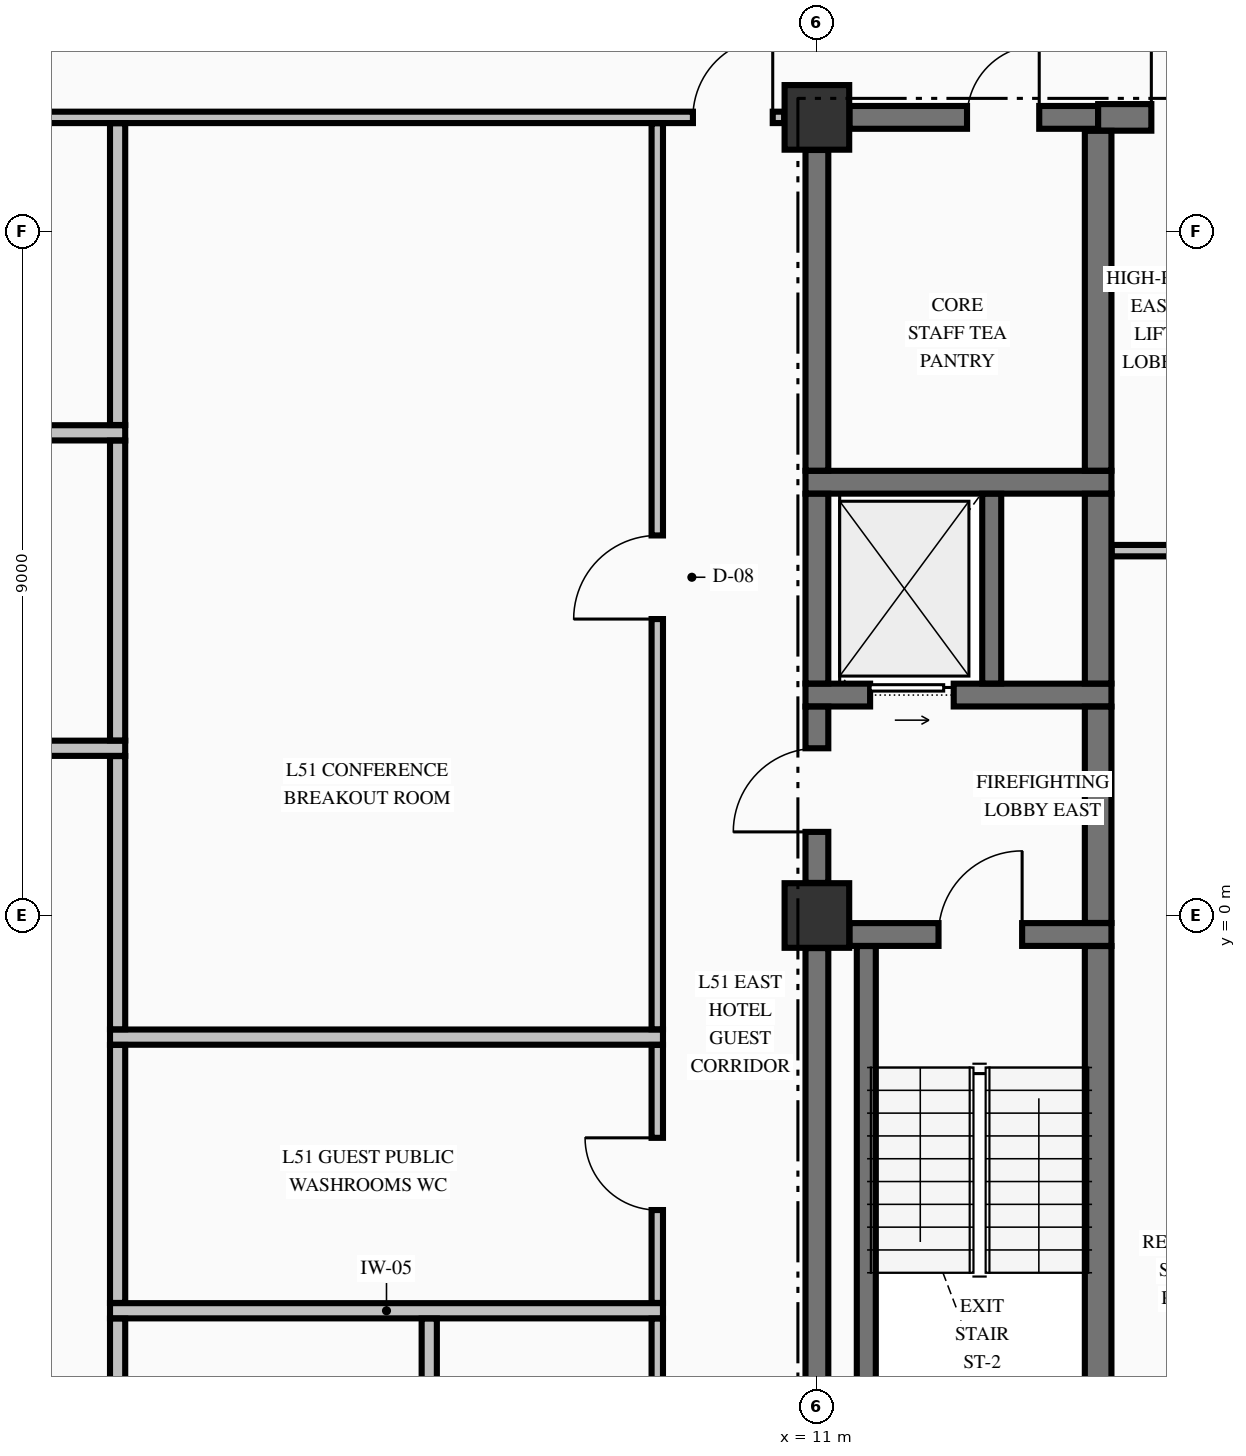
"""IFC4 building model, lengths in metres.
Left out: names, types, materials, properties, quantities, classifications, styles, units other than length and angle.
Written with IfcOpenShell. Run it as: python <this file> out.ifc"""

import sys

from ifc_helpers import new_model, si_unit, direction, frame, frame_2d, origin, origin_2d, place, context, subcontext, project, spatial, rectangle, extrude, element, fill, save


model = new_model("IFC4")
c1 = context("Model", 3, precision=1e-05, world=origin(), true_north=direction((0.0, 1.0)))
c2 = subcontext(c1, "Body", "Model", "MODEL_VIEW")
j1 = project(units=[si_unit("LENGTHUNIT", "METRE"), si_unit("PLANEANGLEUNIT", "RADIAN")], contexts=[c1])
p1 = place(None, origin())
s1 = spatial("IfcSite", under=j1, at=p1, CompositionType="ELEMENT")
p2 = place(p1, origin())
s2 = spatial("IfcBuilding", under=s1, at=p2, CompositionType="ELEMENT")
p3 = place(p2, frame((0.0, 0.0, 198.26)))
s3 = spatial("IfcBuildingStorey", under=s2, at=p3, CompositionType="ELEMENT", Elevation=198.26)
for number, where, z_axis, x_axis in (
    (1, (11.0, 0.0, -0.25), (0.0, 0.0, 1.0), (1.0, 0.0, 0.0)),
    (2, (11.0, 10.5, -0.25), (0.0, 0.0, 1.0), (1.0, 0.0, 0.0)),
):
    element("IfcColumn", number, at=place(p3, frame(where, z_axis=z_axis, x_axis=x_axis)), inside=s3, PredefinedType="COLUMN", context=c2, shape_type="SweptSolid", body=[
        extrude(rectangle(XDim=0.85, YDim=0.85, at=origin_2d()), origin(), (0.0, 0.0, 1.0), 3.4),
    ])
p4 = place(p3, frame((11.429, -0.25, 0.0), z_axis=(0.0, 0.0, 1.0), x_axis=(1.0, 0.0, 0.0)))
e3 = element("IfcWall", 3, at=p4, inside=s3, PredefinedType="SHEAR", context=c2, shape_type="SweptSolid", body=[
    extrude(rectangle(XDim=3.446, YDim=0.3, at=frame_2d((1.723, 0.0))), origin(), (0.0, 0.0, 1.0), 3.15),
])
p5 = place(p4, frame((1.171, 0.0, 0.0)))
e4 = element("IfcOpeningElement", 4, at=p5, cuts=e3, PredefinedType="OPENING", context=c2, shape_type="SweptSolid", body=[
    extrude(rectangle(XDim=1.1, YDim=2.15, at=frame_2d((0.55, 1.075))), frame((0.0, 0.16, 0.0), z_axis=(0.0, -1.0, 0.0), x_axis=(1.0, 0.0, 0.0)), (0.0, 0.0, 1.0), 0.32),
])
p6 = place(p3, frame((10.85, 2.9, 0.0), z_axis=(0.0, 0.0, 1.0), x_axis=(1.0, 0.0, 0.0)))
e5 = element("IfcWall", 5, at=p6, inside=s3, PredefinedType="SHEAR", context=c2, shape_type="SweptSolid", body=[
    extrude(rectangle(XDim=4.025, YDim=0.3, at=frame_2d((2.012, 0.0))), origin(), (0.0, 0.0, 1.0), 3.15),
])
p7 = place(p6, frame((0.85, 0.0, 0.0)))
e6 = element("IfcOpeningElement", 6, at=p7, cuts=e5, PredefinedType="OPENING", context=c2, shape_type="SweptSolid", body=[
    extrude(rectangle(XDim=1.1, YDim=2.2, at=frame_2d((0.55, 1.1))), frame((0.0, 0.16, 0.0), z_axis=(0.0, -1.0, 0.0), x_axis=(1.0, 0.0, 0.0)), (0.0, 0.0, 1.0), 0.32),
])
p8 = place(p3, frame((10.85, 5.7, 0.0), z_axis=(0.0, 0.0, 1.0), x_axis=(1.0, 0.0, 0.0)))
e7 = element("IfcWall", 7, at=p8, inside=s3, PredefinedType="SHEAR", context=c2, shape_type="SweptSolid", body=[
    extrude(rectangle(XDim=4.025, YDim=0.3, at=frame_2d((2.012, 0.0))), origin(), (0.0, 0.0, 1.0), 3.15),
])
p9 = place(p3, frame((11.429, 10.5, 0.0), z_axis=(0.0, 0.0, 1.0), x_axis=(1.0, 0.0, 0.0)))
e8 = element("IfcWall", 8, at=p9, inside=s3, PredefinedType="SHEAR", context=c2, shape_type="SweptSolid", body=[
    extrude(rectangle(XDim=3.271, YDim=0.3, at=frame_2d((1.635, 0.0))), origin(), (0.0, 0.0, 1.0), 3.15),
])
p10 = place(p9, frame((1.546, 0.0, 0.0)))
e9 = element("IfcOpeningElement", 9, at=p10, cuts=e8, PredefinedType="OPENING", context=c2, shape_type="SweptSolid", body=[
    extrude(rectangle(XDim=0.95, YDim=2.15, at=frame_2d((0.475, 1.075))), frame((0.0, 0.16, 0.0), z_axis=(0.0, -1.0, 0.0), x_axis=(1.0, 0.0, 0.0)), (0.0, 0.0, 1.0), 0.32),
])
p11 = place(p3, frame((14.7, 10.5, 0.0), z_axis=(0.0, 0.0, 1.0), x_axis=(1.0, 0.0, 0.0)))
e10 = element("IfcWall", 10, at=p11, inside=s3, PredefinedType="SHEAR", context=c2, shape_type="SweptSolid", body=[
    extrude(rectangle(XDim=4.871, YDim=0.35, at=frame_2d((2.436, 0.0))), origin(), (0.0, 0.0, 1.0), 3.15),
])
p12 = place(p11, frame((0.7, 0.0, 0.0)))
e11 = element("IfcOpeningElement", 11, at=p12, cuts=e10, PredefinedType="OPENING", context=c2, shape_type="SweptSolid", body=[
    extrude(rectangle(XDim=1.1, YDim=2.15, at=frame_2d((0.55, 1.075))), frame((0.0, 0.185, 0.0), z_axis=(0.0, -1.0, 0.0), x_axis=(1.0, 0.0, 0.0)), (0.0, 0.0, 1.0), 0.37),
])
for number, where, z_axis, x_axis in (
    (12, (1.7, -5.2, 0.0), (0.0, 0.0, 1.0), (1.0, 0.0, 0.0)),
    (13, (1.7, -1.6, 0.0), (0.0, 0.0, 1.0), (1.0, 0.0, 0.0)),
):
    element("IfcWall", number, at=place(p3, frame(where, z_axis=z_axis, x_axis=x_axis)), inside=s3, PredefinedType="PARTITIONING", context=c2, shape_type="SweptSolid", body=[
        extrude(rectangle(XDim=7.275, YDim=0.2, at=frame_2d((3.638, 0.0))), origin(), (0.0, 0.0, 1.0), 3.15),
    ])
p13 = place(p3, frame((-8.975, 2.2, 0.0), z_axis=(0.0, 0.0, 1.0), x_axis=(1.0, 0.0, 0.0)))
e14 = element("IfcWall", 14, at=p13, inside=s3, PredefinedType="PARTITIONING", context=c2, shape_type="SweptSolid", body=[
    extrude(rectangle(XDim=10.875, YDim=0.2, at=frame_2d((5.438, 0.0))), origin(), (0.0, 0.0, 1.0), 3.15),
])
p14 = place(p3, frame((14.878, 4.8, 0.0), z_axis=(0.0, 0.0, 1.0), x_axis=(1.0, 0.0, 0.0)))
e15 = element("IfcWall", 15, at=p14, inside=s3, PredefinedType="PARTITIONING", context=c2, shape_type="SweptSolid", body=[
    extrude(rectangle(XDim=4.944, YDim=0.15, at=frame_2d((2.472, 0.0))), origin(), (0.0, 0.0, 1.0), 3.15),
])
p15 = place(p3, frame((-8.975, 6.35, 0.0), z_axis=(0.0, 0.0, 1.0), x_axis=(1.0, 0.0, 0.0)))
e16 = element("IfcWall", 16, at=p15, inside=s3, PredefinedType="PARTITIONING", context=c2, shape_type="SweptSolid", body=[
    extrude(rectangle(XDim=10.875, YDim=0.2, at=frame_2d((5.438, 0.0))), origin(), (0.0, 0.0, 1.0), 3.15),
])
p16 = place(p3, frame((-10.569, 10.5, 0.0), z_axis=(0.0, 0.0, 1.0), x_axis=(1.0, 0.0, 0.0)))
e17 = element("IfcWall", 17, at=p16, inside=s3, PredefinedType="PARTITIONING", context=c2, shape_type="SweptSolid", body=[
    extrude(rectangle(XDim=21.138, YDim=0.15, at=frame_2d((10.569, 0.0))), origin(), (0.0, 0.0, 1.0), 3.15),
])
p17 = place(p16, frame((0.15, 0.0, 0.0)))
e18 = element("IfcOpeningElement", 18, at=p17, cuts=e17, PredefinedType="OPENING", context=c2, shape_type="SweptSolid", body=[
    extrude(rectangle(XDim=1.05, YDim=2.15, at=frame_2d((0.525, 1.075))), frame((0.0, 0.085, 0.0), z_axis=(0.0, -1.0, 0.0), x_axis=(1.0, 0.0, 0.0)), (0.0, 0.0, 1.0), 0.17),
])
p18 = place(p16, frame((19.938, 0.0, 0.0)))
e19 = element("IfcOpeningElement", 19, at=p18, cuts=e17, PredefinedType="OPENING", context=c2, shape_type="SweptSolid", body=[
    extrude(rectangle(XDim=1.05, YDim=2.15, at=frame_2d((0.525, 1.075))), frame((0.0, 0.085, 0.0), z_axis=(0.0, -1.0, 0.0), x_axis=(1.0, 0.0, 0.0)), (0.0, 0.0, 1.0), 0.17),
])
p19 = place(p3, frame((11.0, -9.521, 0.0), z_axis=(0.0, 0.0, 1.0), x_axis=(0.0, 1.0, 0.0)))
e20 = element("IfcWall", 20, at=p19, inside=s3, PredefinedType="SHEAR", context=c2, shape_type="SweptSolid", body=[
    extrude(rectangle(XDim=9.092, YDim=0.3, at=frame_2d((4.546, 0.0))), origin(), (0.0, 0.0, 1.0), 3.15),
])
p20 = place(p3, frame((11.0, 0.429, 0.0), z_axis=(0.0, 0.0, 1.0), x_axis=(0.0, 1.0, 0.0)))
e21 = element("IfcWall", 21, at=p20, inside=s3, PredefinedType="SHEAR", context=c2, shape_type="SweptSolid", body=[
    extrude(rectangle(XDim=2.319, YDim=0.3, at=frame_2d((1.16, 0.0))), origin(), (0.0, 0.0, 1.0), 3.15),
])
p21 = place(p20, frame((0.671, 0.0, 0.0)))
e22 = element("IfcOpeningElement", 22, at=p21, cuts=e21, PredefinedType="OPENING", context=c2, shape_type="SweptSolid", body=[
    extrude(rectangle(XDim=1.1, YDim=2.15, at=frame_2d((0.55, 1.075))), frame((0.0, 0.16, 0.0), z_axis=(0.0, -1.0, 0.0), x_axis=(1.0, 0.0, 0.0)), (0.0, 0.0, 1.0), 0.32),
])
p22 = place(p3, frame((11.0, 3.052, 0.0), z_axis=(0.0, 0.0, 1.0), x_axis=(0.0, 1.0, 0.0)))
e23 = element("IfcWall", 23, at=p22, inside=s3, PredefinedType="SHEAR", context=c2, shape_type="SweptSolid", body=[
    extrude(rectangle(XDim=2.496, YDim=0.3, at=frame_2d((1.248, 0.0))), origin(), (0.0, 0.0, 1.0), 3.15),
])
p23 = place(p3, frame((11.0, 5.852, 0.0), z_axis=(0.0, 0.0, 1.0), x_axis=(0.0, 1.0, 0.0)))
e24 = element("IfcWall", 24, at=p23, inside=s3, PredefinedType="SHEAR", context=c2, shape_type="SweptSolid", body=[
    extrude(rectangle(XDim=4.219, YDim=0.3, at=frame_2d((2.109, 0.0))), origin(), (0.0, 0.0, 1.0), 3.15),
])
p24 = place(p3, frame((11.65, -9.798, 0.0), z_axis=(0.0, 0.0, 1.0), x_axis=(0.0, 1.0, 0.0)))
e25 = element("IfcWall", 25, at=p24, inside=s3, PredefinedType="SOLIDWALL", context=c2, shape_type="SweptSolid", body=[
    extrude(rectangle(XDim=9.396, YDim=0.25, at=frame_2d((4.698, 0.0))), origin(), (0.0, 0.0, 1.0), 3.15),
])
p25 = place(p3, frame((13.3, 3.052, 0.0), z_axis=(0.0, 0.0, 1.0), x_axis=(0.0, 1.0, 0.0)))
e26 = element("IfcWall", 26, at=p25, inside=s3, PredefinedType="SOLIDWALL", context=c2, shape_type="SweptSolid", body=[
    extrude(rectangle(XDim=2.496, YDim=0.25, at=frame_2d((1.248, 0.0))), origin(), (0.0, 0.0, 1.0), 3.15),
])
p26 = place(p3, frame((14.7, -9.773, 0.0), z_axis=(0.0, 0.0, 1.0), x_axis=(0.0, 1.0, 0.0)))
e27 = element("IfcWall", 27, at=p26, inside=s3, PredefinedType="SHEAR", context=c2, shape_type="SweptSolid", body=[
    extrude(rectangle(XDim=9.371, YDim=0.35, at=frame_2d((4.686, 0.0))), origin(), (0.0, 0.0, 1.0), 3.15),
])
p27 = place(p3, frame((14.7, -0.098, 0.0), z_axis=(0.0, 0.0, 1.0), x_axis=(0.0, 1.0, 0.0)))
e28 = element("IfcWall", 28, at=p27, inside=s3, PredefinedType="SHEAR", context=c2, shape_type="SweptSolid", body=[
    extrude(rectangle(XDim=2.846, YDim=0.35, at=frame_2d((1.423, 0.0))), origin(), (0.0, 0.0, 1.0), 3.15),
])
p28 = place(p3, frame((14.7, 3.052, 0.0), z_axis=(0.0, 0.0, 1.0), x_axis=(0.0, 1.0, 0.0)))
e29 = element("IfcWall", 29, at=p28, inside=s3, PredefinedType="SHEAR", context=c2, shape_type="SweptSolid", body=[
    extrude(rectangle(XDim=2.496, YDim=0.35, at=frame_2d((1.248, 0.0))), origin(), (0.0, 0.0, 1.0), 3.15),
])
p29 = place(p3, frame((14.7, 5.852, 0.0), z_axis=(0.0, 0.0, 1.0), x_axis=(0.0, 1.0, 0.0)))
e30 = element("IfcWall", 30, at=p29, inside=s3, PredefinedType="SHEAR", context=c2, shape_type="SweptSolid", body=[
    extrude(rectangle(XDim=4.471, YDim=0.35, at=frame_2d((2.235, 0.0))), origin(), (0.0, 0.0, 1.0), 3.15),
])
p30 = place(p3, frame((1.8, -9.872, 0.0), z_axis=(0.0, 0.0, 1.0), x_axis=(0.0, 1.0, 0.0)))
e31 = element("IfcWall", 31, at=p30, inside=s3, PredefinedType="PARTITIONING", context=c2, shape_type="SweptSolid", body=[
    extrude(rectangle(XDim=4.569, YDim=0.2, at=frame_2d((2.285, 0.0))), origin(), (0.0, 0.0, 1.0), 3.15),
])
p31 = place(p3, frame((1.8, -5.097, 0.0), z_axis=(0.0, 0.0, 1.0), x_axis=(0.0, 1.0, 0.0)))
e32 = element("IfcWall", 32, at=p31, inside=s3, PredefinedType="PARTITIONING", context=c2, shape_type="SweptSolid", body=[
    extrude(rectangle(XDim=3.394, YDim=0.2, at=frame_2d((1.697, 0.0))), origin(), (0.0, 0.0, 1.0), 3.15),
])
p32 = place(p3, frame((1.8, -1.497, 0.0), z_axis=(0.0, 0.0, 1.0), x_axis=(0.0, 1.0, 0.0)))
e33 = element("IfcWall", 33, at=p32, inside=s3, PredefinedType="PARTITIONING", context=c2, shape_type="SweptSolid", body=[
    extrude(rectangle(XDim=3.594, YDim=0.2, at=frame_2d((1.797, 0.0))), origin(), (0.0, 0.0, 1.0), 3.15),
])
p33 = place(p3, frame((1.8, 2.303, 0.0), z_axis=(0.0, 0.0, 1.0), x_axis=(0.0, 1.0, 0.0)))
e34 = element("IfcWall", 34, at=p33, inside=s3, PredefinedType="PARTITIONING", context=c2, shape_type="SweptSolid", body=[
    extrude(rectangle(XDim=3.944, YDim=0.2, at=frame_2d((1.972, 0.0))), origin(), (0.0, 0.0, 1.0), 3.15),
])
p34 = place(p3, frame((1.8, 6.453, 0.0), z_axis=(0.0, 0.0, 1.0), x_axis=(0.0, 1.0, 0.0)))
e35 = element("IfcWall", 35, at=p34, inside=s3, PredefinedType="PARTITIONING", context=c2, shape_type="SweptSolid", body=[
    extrude(rectangle(XDim=3.969, YDim=0.2, at=frame_2d((1.985, 0.0))), origin(), (0.0, 0.0, 1.0), 3.15),
])
p35 = place(p3, frame((5.9, -9.872, 0.0), z_axis=(0.0, 0.0, 1.0), x_axis=(0.0, 1.0, 0.0)))
e36 = element("IfcWall", 36, at=p35, inside=s3, PredefinedType="PARTITIONING", context=c2, shape_type="SweptSolid", body=[
    extrude(rectangle(XDim=4.569, YDim=0.2, at=frame_2d((2.285, 0.0))), origin(), (0.0, 0.0, 1.0), 3.15),
])
p36 = place(p3, frame((8.9, -9.872, 0.0), z_axis=(0.0, 0.0, 1.0), x_axis=(0.0, 1.0, 0.0)))
e37 = element("IfcWall", 37, at=p36, inside=s3, PredefinedType="PARTITIONING", context=c2, shape_type="SweptSolid", body=[
    extrude(rectangle(XDim=4.569, YDim=0.15, at=frame_2d((2.285, 0.0))), origin(), (0.0, 0.0, 1.0), 3.15),
])
p37 = place(p36, frame((1.847, 0.0, 0.0)))
e38 = element("IfcOpeningElement", 38, at=p37, cuts=e37, PredefinedType="OPENING", context=c2, shape_type="SweptSolid", body=[
    extrude(rectangle(XDim=0.95, YDim=2.15, at=frame_2d((0.475, 1.075))), frame((0.0, 0.085, 0.0), z_axis=(0.0, -1.0, 0.0), x_axis=(1.0, 0.0, 0.0)), (0.0, 0.0, 1.0), 0.17),
])
p38 = place(p3, frame((8.9, -5.097, 0.0), z_axis=(0.0, 0.0, 1.0), x_axis=(0.0, 1.0, 0.0)))
e39 = element("IfcWall", 39, at=p38, inside=s3, PredefinedType="PARTITIONING", context=c2, shape_type="SweptSolid", body=[
    extrude(rectangle(XDim=3.394, YDim=0.15, at=frame_2d((1.697, 0.0))), origin(), (0.0, 0.0, 1.0), 3.15),
])
p39 = place(p38, frame((1.222, 0.0, 0.0)))
e40 = element("IfcOpeningElement", 40, at=p39, cuts=e39, PredefinedType="OPENING", context=c2, shape_type="SweptSolid", body=[
    extrude(rectangle(XDim=0.95, YDim=2.15, at=frame_2d((0.475, 1.075))), frame((0.0, 0.085, 0.0), z_axis=(0.0, -1.0, 0.0), x_axis=(1.0, 0.0, 0.0)), (0.0, 0.0, 1.0), 0.17),
])
p40 = place(p3, frame((8.9, -1.497, 0.0), z_axis=(0.0, 0.0, 1.0), x_axis=(0.0, 1.0, 0.0)))
e41 = element("IfcWall", 41, at=p40, inside=s3, PredefinedType="PARTITIONING", context=c2, shape_type="SweptSolid", body=[
    extrude(rectangle(XDim=11.919, YDim=0.15, at=frame_2d((5.959, 0.0))), origin(), (0.0, 0.0, 1.0), 3.15),
])
p41 = place(p40, frame((5.397, 0.0, 0.0)))
e42 = element("IfcOpeningElement", 42, at=p41, cuts=e41, PredefinedType="OPENING", context=c2, shape_type="SweptSolid", body=[
    extrude(rectangle(XDim=1.1, YDim=2.15, at=frame_2d((0.55, 1.075))), frame((0.0, 0.085, 0.0), z_axis=(0.0, -1.0, 0.0), x_axis=(1.0, 0.0, 0.0)), (0.0, 0.0, 1.0), 0.17),
])
p42 = place(p5, origin())
e43 = element("IfcDoor", 43, at=p42, inside=s3, OperationType="SINGLE_SWING_RIGHT", PredefinedType="DOOR", context=c2, shape_type="SweptSolid", body=[
    extrude(rectangle(XDim=1.1, YDim=2.15, at=frame_2d((0.55, 1.075))), frame((0.0, 0.025, 0.0), z_axis=(0.0, -1.0, 0.0), x_axis=(1.0, 0.0, 0.0)), (0.0, 0.0, 1.0), 0.05),
])
fill(e4, e43)
p43 = place(p21, origin())
e44 = element("IfcDoor", 44, at=p43, inside=s3, OperationType="SINGLE_SWING_LEFT", PredefinedType="DOOR", context=c2, shape_type="SweptSolid", body=[
    extrude(rectangle(XDim=1.1, YDim=2.15, at=frame_2d((0.55, 1.075))), frame((0.0, 0.025, 0.0), z_axis=(0.0, -1.0, 0.0), x_axis=(1.0, 0.0, 0.0)), (0.0, 0.0, 1.0), 0.05),
])
fill(e22, e44)
p44 = place(p7, origin())
e45 = element("IfcDoor", 45, at=p44, inside=s3, OperationType="SLIDING_TO_RIGHT", PredefinedType="DOOR", context=c2, shape_type="SweptSolid", body=[
    extrude(rectangle(XDim=1.1, YDim=2.2, at=frame_2d((0.55, 1.1))), frame((0.0, 0.025, 0.0), z_axis=(0.0, -1.0, 0.0), x_axis=(1.0, 0.0, 0.0)), (0.0, 0.0, 1.0), 0.05),
])
fill(e6, e45)
p45 = place(p10, origin())
e46 = element("IfcDoor", 46, at=p45, inside=s3, OperationType="SINGLE_SWING_RIGHT", PredefinedType="DOOR", context=c2, shape_type="SweptSolid", body=[
    extrude(rectangle(XDim=0.95, YDim=2.15, at=frame_2d((0.475, 1.075))), frame((0.0, 0.025, 0.0), z_axis=(0.0, -1.0, 0.0), x_axis=(1.0, 0.0, 0.0)), (0.0, 0.0, 1.0), 0.05),
])
fill(e9, e46)
p46 = place(p12, origin())
e47 = element("IfcDoor", 47, at=p46, inside=s3, OperationType="SINGLE_SWING_LEFT", PredefinedType="DOOR", context=c2, shape_type="SweptSolid", body=[
    extrude(rectangle(XDim=1.1, YDim=2.15, at=frame_2d((0.55, 1.075))), frame((0.0, 0.025, 0.0), z_axis=(0.0, -1.0, 0.0), x_axis=(1.0, 0.0, 0.0)), (0.0, 0.0, 1.0), 0.05),
])
fill(e11, e47)
p47 = place(p18, origin())
e48 = element("IfcDoor", 48, at=p47, inside=s3, OperationType="SINGLE_SWING_RIGHT", PredefinedType="DOOR", context=c2, shape_type="SweptSolid", body=[
    extrude(rectangle(XDim=1.05, YDim=2.15, at=frame_2d((0.525, 1.075))), frame((0.0, 0.025, 0.0), z_axis=(0.0, -1.0, 0.0), x_axis=(1.0, 0.0, 0.0)), (0.0, 0.0, 1.0), 0.05),
])
fill(e19, e48)
p48 = place(p41, origin())
e49 = element("IfcDoor", 49, at=p48, inside=s3, OperationType="SINGLE_SWING_LEFT", PredefinedType="DOOR", context=c2, shape_type="SweptSolid", body=[
    extrude(rectangle(XDim=1.1, YDim=2.15, at=frame_2d((0.55, 1.075))), frame((0.0, 0.025, 0.0), z_axis=(0.0, -1.0, 0.0), x_axis=(1.0, 0.0, 0.0)), (0.0, 0.0, 1.0), 0.05),
])
fill(e42, e49)
p49 = place(p39, origin())
e50 = element("IfcDoor", 50, at=p49, inside=s3, OperationType="SINGLE_SWING_RIGHT", PredefinedType="DOOR", context=c2, shape_type="SweptSolid", body=[
    extrude(rectangle(XDim=0.95, YDim=2.15, at=frame_2d((0.475, 1.075))), frame((0.0, 0.025, 0.0), z_axis=(0.0, -1.0, 0.0), x_axis=(1.0, 0.0, 0.0)), (0.0, 0.0, 1.0), 0.05),
])
fill(e40, e50)
save(model, sys.argv[1])
